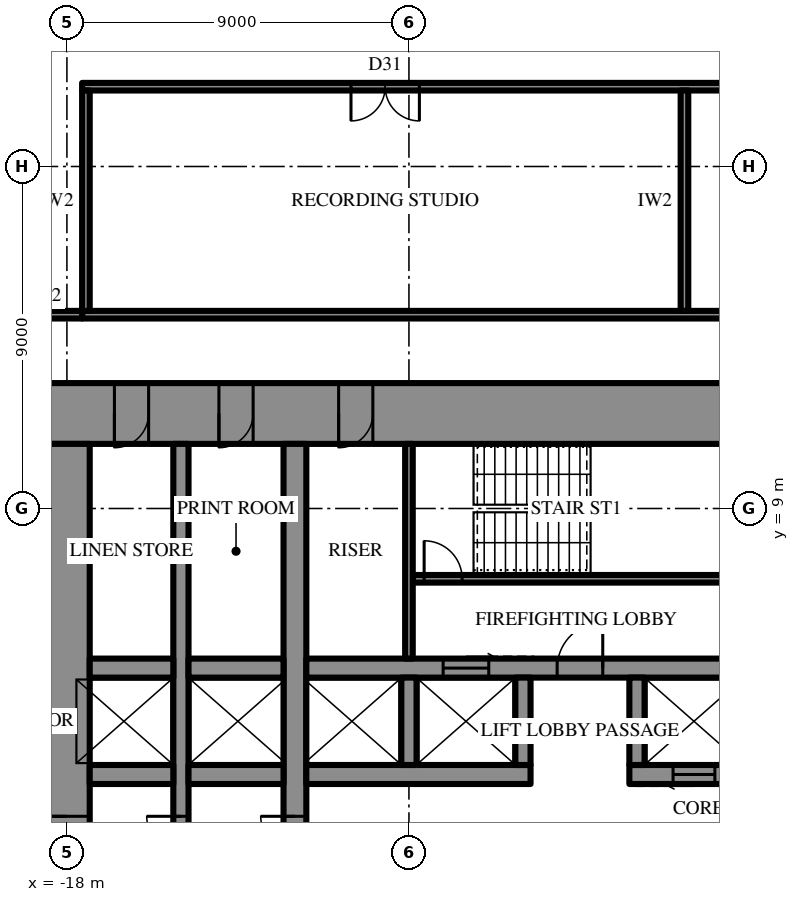
"""IFC4 building model, lengths in metres.
Left out: names, types, materials, properties, quantities, classifications, styles, units other than length and angle.
Written with IfcOpenShell. Run it as: python <this file> out.ifc"""

import sys

from ifc_helpers import new_model, si_unit, direction, frame, frame_2d, origin, place, context, subcontext, project, spatial, rectangle, extrude, element, fill, save


model = new_model("IFC4")
c1 = context("Model", 3, precision=1e-05, world=origin(), true_north=direction((0.0, 1.0)))
c2 = subcontext(c1, "Body", "Model", "MODEL_VIEW")
j1 = project(units=[si_unit("LENGTHUNIT", "METRE"), si_unit("PLANEANGLEUNIT", "RADIAN")], contexts=[c1])
p1 = place(None, origin())
s1 = spatial("IfcSite", under=j1, at=p1, CompositionType="ELEMENT")
p2 = place(p1, origin())
s2 = spatial("IfcBuilding", under=s1, at=p2, CompositionType="ELEMENT")
p3 = place(p2, frame((0.0, 0.0, 103.3)))
s3 = spatial("IfcBuildingStorey", under=s2, at=p3, CompositionType="ELEMENT", Elevation=103.3)
p4 = place(p3, frame((-18.6, 11.5, 0.0), z_axis=(0.0, 0.0, 1.0), x_axis=(1.0, 0.0, 0.0)))
e1 = element("IfcWall", 1, at=p4, inside=s3, PredefinedType="SHEAR", context=c2, shape_type="SweptSolid", body=[
    extrude(rectangle(XDim=37.2, YDim=1.6, at=frame_2d((18.6, 0.0))), origin(), (0.0, 0.0, 1.0), 4.2),
])
p5 = place(p4, frame((19.45, 0.0, 0.0)))
e2 = element("IfcOpeningElement", 2, at=p5, cuts=e1, PredefinedType="OPENING", context=c2, shape_type="SweptSolid", body=[
    extrude(rectangle(XDim=0.9, YDim=2.2, at=frame_2d((0.45, 1.1))), frame((0.0, 0.81, 0.0), z_axis=(0.0, -1.0, 0.0), x_axis=(1.0, 0.0, 0.0)), (0.0, 0.0, 1.0), 1.62),
])
p6 = place(p4, frame((22.45, 0.0, 0.0)))
e3 = element("IfcOpeningElement", 3, at=p6, cuts=e1, PredefinedType="OPENING", context=c2, shape_type="SweptSolid", body=[
    extrude(rectangle(XDim=0.9, YDim=2.2, at=frame_2d((0.45, 1.1))), frame((0.0, 0.81, 0.0), z_axis=(0.0, -1.0, 0.0), x_axis=(1.0, 0.0, 0.0)), (0.0, 0.0, 1.0), 1.62),
])
p7 = place(p4, frame((25.5, 0.0, 0.0)))
e4 = element("IfcOpeningElement", 4, at=p7, cuts=e1, PredefinedType="OPENING", context=c2, shape_type="SweptSolid", body=[
    extrude(rectangle(XDim=1.0, YDim=2.2, at=frame_2d((0.5, 1.1))), frame((0.0, 0.81, 0.0), z_axis=(0.0, -1.0, 0.0), x_axis=(1.0, 0.0, 0.0)), (0.0, 0.0, 1.0), 1.62),
])
p8 = place(p4, frame((1.85, 0.0, 0.0)))
e5 = element("IfcOpeningElement", 5, at=p8, cuts=e1, PredefinedType="OPENING", context=c2, shape_type="SweptSolid", body=[
    extrude(rectangle(XDim=0.9, YDim=2.2, at=frame_2d((0.45, 1.1))), frame((0.0, 0.81, 0.0), z_axis=(0.0, -1.0, 0.0), x_axis=(1.0, 0.0, 0.0)), (0.0, 0.0, 1.0), 1.62),
])
p9 = place(p4, frame((4.6, 0.0, 0.0)))
e6 = element("IfcOpeningElement", 6, at=p9, cuts=e1, PredefinedType="OPENING", context=c2, shape_type="SweptSolid", body=[
    extrude(rectangle(XDim=0.9, YDim=2.2, at=frame_2d((0.45, 1.1))), frame((0.0, 0.81, 0.0), z_axis=(0.0, -1.0, 0.0), x_axis=(1.0, 0.0, 0.0)), (0.0, 0.0, 1.0), 1.62),
])
p10 = place(p4, frame((7.75, 0.0, 0.0)))
e7 = element("IfcOpeningElement", 7, at=p10, cuts=e1, PredefinedType="OPENING", context=c2, shape_type="SweptSolid", body=[
    extrude(rectangle(XDim=0.9, YDim=2.2, at=frame_2d((0.45, 1.1))), frame((0.0, 0.81, 0.0), z_axis=(0.0, -1.0, 0.0), x_axis=(1.0, 0.0, 0.0)), (0.0, 0.0, 1.0), 1.62),
])
p11 = place(p4, frame((28.55, 0.0, 0.0)))
e8 = element("IfcOpeningElement", 8, at=p11, cuts=e1, PredefinedType="OPENING", context=c2, shape_type="SweptSolid", body=[
    extrude(rectangle(XDim=0.9, YDim=2.2, at=frame_2d((0.45, 1.1))), frame((0.0, 0.81, 0.0), z_axis=(0.0, -1.0, 0.0), x_axis=(1.0, 0.0, 0.0)), (0.0, 0.0, 1.0), 1.62),
])
p12 = place(p4, frame((31.7, 0.0, 0.0)))
e9 = element("IfcOpeningElement", 9, at=p12, cuts=e1, PredefinedType="OPENING", context=c2, shape_type="SweptSolid", body=[
    extrude(rectangle(XDim=0.9, YDim=2.2, at=frame_2d((0.45, 1.1))), frame((0.0, 0.81, 0.0), z_axis=(0.0, -1.0, 0.0), x_axis=(1.0, 0.0, 0.0)), (0.0, 0.0, 1.0), 1.62),
])
p13 = place(p4, frame((34.45, 0.0, 0.0)))
e10 = element("IfcOpeningElement", 10, at=p13, cuts=e1, PredefinedType="OPENING", context=c2, shape_type="SweptSolid", body=[
    extrude(rectangle(XDim=0.9, YDim=2.2, at=frame_2d((0.45, 1.1))), frame((0.0, 0.81, 0.0), z_axis=(0.0, -1.0, 0.0), x_axis=(1.0, 0.0, 0.0)), (0.0, 0.0, 1.0), 1.62),
])
p14 = place(p3, frame((-18.0, 10.7, 0.0), z_axis=(0.0, 0.0, 1.0), x_axis=(0.0, -1.0, 0.0)))
e11 = element("IfcWall", 11, at=p14, inside=s3, PredefinedType="SHEAR", context=c2, shape_type="SweptSolid", body=[
    extrude(rectangle(XDim=21.4, YDim=1.2, at=frame_2d((10.7, 0.0))), origin(), (0.0, 0.0, 1.0), 4.2),
])
p15 = place(p14, frame((9.8, 0.0, 0.0)))
e12 = element("IfcOpeningElement", 12, at=p15, cuts=e11, PredefinedType="OPENING", context=c2, shape_type="SweptSolid", body=[
    extrude(rectangle(XDim=1.8, YDim=2.4, at=frame_2d((0.9, 1.2))), frame((0.0, 0.61, 0.0), z_axis=(0.0, -1.0, 0.0), x_axis=(1.0, 0.0, 0.0)), (0.0, 0.0, 1.0), 1.22),
])
p16 = place(p3, frame((-12.0, -10.7, 0.0), z_axis=(0.0, 0.0, 1.0), x_axis=(0.0, 1.0, 0.0)))
e13 = element("IfcWall", 13, at=p16, inside=s3, PredefinedType="SHEAR", context=c2, shape_type="SweptSolid", body=[
    extrude(rectangle(XDim=21.4, YDim=0.6, at=frame_2d((10.7, 0.0))), origin(), (0.0, 0.0, 1.0), 4.2),
])
p17 = place(p16, frame((9.8, 0.0, 0.0)))
e14 = element("IfcOpeningElement", 14, at=p17, cuts=e13, PredefinedType="OPENING", context=c2, shape_type="SweptSolid", body=[
    extrude(rectangle(XDim=1.8, YDim=2.4, at=frame_2d((0.9, 1.2))), frame((0.0, 0.31, 0.0), z_axis=(0.0, -1.0, 0.0), x_axis=(1.0, 0.0, 0.0)), (0.0, 0.0, 1.0), 0.62),
])
p18 = place(p3, frame((-15.0, -10.7, 0.0), z_axis=(0.0, 0.0, 1.0), x_axis=(0.0, 1.0, 0.0)))
e15 = element("IfcWall", 15, at=p18, inside=s3, PredefinedType="SHEAR", context=c2, shape_type="SweptSolid", body=[
    extrude(rectangle(XDim=21.4, YDim=0.4, at=frame_2d((10.7, 0.0))), origin(), (0.0, 0.0, 1.0), 4.2),
])
p19 = place(p18, frame((9.8, 0.0, 0.0)))
e16 = element("IfcOpeningElement", 16, at=p19, cuts=e15, PredefinedType="OPENING", context=c2, shape_type="SweptSolid", body=[
    extrude(rectangle(XDim=1.8, YDim=2.4, at=frame_2d((0.9, 1.2))), frame((0.0, 0.21, 0.0), z_axis=(0.0, -1.0, 0.0), x_axis=(1.0, 0.0, 0.0)), (0.0, 0.0, 1.0), 0.42),
])
p20 = place(p3, frame((-17.4, 2.0, 0.0), z_axis=(0.0, 0.0, 1.0), x_axis=(1.0, 0.0, 0.0)))
e17 = element("IfcWall", 17, at=p20, inside=s3, PredefinedType="SHEAR", context=c2, shape_type="SweptSolid", body=[
    extrude(rectangle(XDim=2.2, YDim=0.5, at=frame_2d((1.1, 0.0))), origin(), (0.0, 0.0, 1.0), 4.2),
])
p21 = place(p3, frame((-14.8, 2.0, 0.0), z_axis=(0.0, 0.0, 1.0), x_axis=(1.0, 0.0, 0.0)))
e18 = element("IfcWall", 18, at=p21, inside=s3, PredefinedType="SHEAR", context=c2, shape_type="SweptSolid", body=[
    extrude(rectangle(XDim=2.5, YDim=0.5, at=frame_2d((1.25, 0.0))), origin(), (0.0, 0.0, 1.0), 4.2),
])
p22 = place(p3, frame((-11.7, 2.0, 0.0), z_axis=(0.0, 0.0, 1.0), x_axis=(1.0, 0.0, 0.0)))
e19 = element("IfcWall", 19, at=p22, inside=s3, PredefinedType="SHEAR", context=c2, shape_type="SweptSolid", body=[
    extrude(rectangle(XDim=5.9, YDim=0.5, at=frame_2d((2.95, 0.0))), origin(), (0.0, 0.0, 1.0), 4.2),
])
p23 = place(p3, frame((-3.2, 2.0, 0.0), z_axis=(0.0, 0.0, 1.0), x_axis=(1.0, 0.0, 0.0)))
e20 = element("IfcWall", 20, at=p23, inside=s3, PredefinedType="SHEAR", context=c2, shape_type="SweptSolid", body=[
    extrude(rectangle(XDim=14.9, YDim=0.5, at=frame_2d((7.45, 0.0))), origin(), (0.0, 0.0, 1.0), 4.2),
])
p24 = place(p23, frame((1.15, 0.0, 0.0)))
e21 = element("IfcOpeningElement", 21, at=p24, cuts=e20, PredefinedType="OPENING", context=c2, shape_type="SweptSolid", body=[
    extrude(rectangle(XDim=1.1, YDim=2.2, at=frame_2d((0.55, 1.1))), frame((0.0, 0.26, 0.0), z_axis=(0.0, -1.0, 0.0), x_axis=(1.0, 0.0, 0.0)), (0.0, 0.0, 1.0), 0.52),
])
p25 = place(p23, frame((4.15, 0.0, 0.0)))
e22 = element("IfcOpeningElement", 22, at=p25, cuts=e20, PredefinedType="OPENING", context=c2, shape_type="SweptSolid", body=[
    extrude(rectangle(XDim=1.1, YDim=2.2, at=frame_2d((0.55, 1.1))), frame((0.0, 0.26, 0.0), z_axis=(0.0, -1.0, 0.0), x_axis=(1.0, 0.0, 0.0)), (0.0, 0.0, 1.0), 0.52),
])
p26 = place(p23, frame((7.15, 0.0, 0.0)))
e23 = element("IfcOpeningElement", 23, at=p26, cuts=e20, PredefinedType="OPENING", context=c2, shape_type="SweptSolid", body=[
    extrude(rectangle(XDim=1.1, YDim=2.2, at=frame_2d((0.55, 1.1))), frame((0.0, 0.26, 0.0), z_axis=(0.0, -1.0, 0.0), x_axis=(1.0, 0.0, 0.0)), (0.0, 0.0, 1.0), 0.52),
])
p27 = place(p23, frame((10.15, 0.0, 0.0)))
e24 = element("IfcOpeningElement", 24, at=p27, cuts=e20, PredefinedType="OPENING", context=c2, shape_type="SweptSolid", body=[
    extrude(rectangle(XDim=1.1, YDim=2.2, at=frame_2d((0.55, 1.1))), frame((0.0, 0.26, 0.0), z_axis=(0.0, -1.0, 0.0), x_axis=(1.0, 0.0, 0.0)), (0.0, 0.0, 1.0), 0.52),
])
p28 = place(p3, frame((-17.4, 4.8, 0.0), z_axis=(0.0, 0.0, 1.0), x_axis=(1.0, 0.0, 0.0)))
e25 = element("IfcWall", 25, at=p28, inside=s3, PredefinedType="SHEAR", context=c2, shape_type="SweptSolid", body=[
    extrude(rectangle(XDim=2.2, YDim=0.5, at=frame_2d((1.1, 0.0))), origin(), (0.0, 0.0, 1.0), 4.2),
])
p29 = place(p3, frame((-14.8, 4.8, 0.0), z_axis=(0.0, 0.0, 1.0), x_axis=(1.0, 0.0, 0.0)))
e26 = element("IfcWall", 26, at=p29, inside=s3, PredefinedType="SHEAR", context=c2, shape_type="SweptSolid", body=[
    extrude(rectangle(XDim=2.5, YDim=0.5, at=frame_2d((1.25, 0.0))), origin(), (0.0, 0.0, 1.0), 4.2),
])
p30 = place(p3, frame((-11.7, 4.8, 0.0), z_axis=(0.0, 0.0, 1.0), x_axis=(1.0, 0.0, 0.0)))
e27 = element("IfcWall", 27, at=p30, inside=s3, PredefinedType="SHEAR", context=c2, shape_type="SweptSolid", body=[
    extrude(rectangle(XDim=23.4, YDim=0.5, at=frame_2d((11.7, 0.0))), origin(), (0.0, 0.0, 1.0), 4.2),
])
p31 = place(p30, frame((6.6, 0.0, 0.0)))
e28 = element("IfcOpeningElement", 28, at=p31, cuts=e27, PredefinedType="OPENING", context=c2, shape_type="SweptSolid", body=[
    extrude(rectangle(XDim=1.2, YDim=2.2, at=frame_2d((0.6, 1.1))), frame((0.0, 0.26, 0.0), z_axis=(0.0, -1.0, 0.0), x_axis=(1.0, 0.0, 0.0)), (0.0, 0.0, 1.0), 0.52),
])
p32 = place(p30, frame((3.6, 0.0, 0.0)))
e29 = element("IfcOpeningElement", 29, at=p32, cuts=e27, PredefinedType="OPENING", context=c2, shape_type="SweptSolid", body=[
    extrude(rectangle(XDim=1.2, YDim=2.2, at=frame_2d((0.6, 1.1))), frame((0.0, 0.26, 0.0), z_axis=(0.0, -1.0, 0.0), x_axis=(1.0, 0.0, 0.0)), (0.0, 0.0, 1.0), 0.52),
])
for number, where, z_axis, x_axis in (
    (30, (-9.0, 2.25, 0.0), (0.0, 0.0, 1.0), (0.0, 1.0, 0.0)),
    (31, (-6.0, 2.25, 0.0), (0.0, 0.0, 1.0), (0.0, 1.0, 0.0)),
    (32, (-3.0, 2.25, 0.0), (0.0, 0.0, 1.0), (0.0, 1.0, 0.0)),
):
    element("IfcWall", number, at=place(p3, frame(where, z_axis=z_axis, x_axis=x_axis)), inside=s3, PredefinedType="SHEAR", context=c2, shape_type="SweptSolid", body=[
        extrude(rectangle(XDim=2.3, YDim=0.4, at=frame_2d((1.15, 0.0))), origin(), (0.0, 0.0, 1.0), 4.2),
    ])
p33 = place(p3, frame((-8.9, 7.15, 0.0), z_axis=(0.0, 0.0, 1.0), x_axis=(1.0, 0.0, 0.0)))
e33 = element("IfcWall", 33, at=p33, inside=s3, PredefinedType="SHEAR", context=c2, shape_type="SweptSolid", body=[
    extrude(rectangle(XDim=8.6, YDim=0.2, at=frame_2d((4.3, 0.0))), origin(), (0.0, 0.0, 1.0), 4.2),
])
p34 = place(p33, frame((0.3, 0.0, 0.0)))
e34 = element("IfcOpeningElement", 34, at=p34, cuts=e33, PredefinedType="OPENING", context=c2, shape_type="SweptSolid", body=[
    extrude(rectangle(XDim=1.0, YDim=2.2, at=frame_2d((0.5, 1.1))), frame((0.0, 0.11, 0.0), z_axis=(0.0, -1.0, 0.0), x_axis=(1.0, 0.0, 0.0)), (0.0, 0.0, 1.0), 0.22),
])
p35 = place(p3, frame((-9.0, 5.05, 0.0), z_axis=(0.0, 0.0, 1.0), x_axis=(0.0, 1.0, 0.0)))
e35 = element("IfcWall", 35, at=p35, inside=s3, PredefinedType="PARTITIONING", context=c2, shape_type="SweptSolid", body=[
    extrude(rectangle(XDim=5.65, YDim=0.2, at=frame_2d((2.825, 0.0))), origin(), (0.0, 0.0, 1.0), 3.9),
])
p36 = place(p3, frame((-17.6, 14.1, 0.0), z_axis=(0.0, 0.0, 1.0), x_axis=(1.0, 0.0, 0.0)))
e36 = element("IfcWall", 36, at=p36, inside=s3, PredefinedType="PARTITIONING", context=c2, shape_type="SweptSolid", body=[
    extrude(rectangle(XDim=35.2, YDim=0.2, at=frame_2d((17.6, 0.0))), origin(), (0.0, 0.0, 1.0), 3.9),
])
p37 = place(p3, frame((-17.6, 20.1, 0.0), z_axis=(0.0, 0.0, 1.0), x_axis=(1.0, 0.0, 0.0)))
e37 = element("IfcWall", 37, at=p37, inside=s3, PredefinedType="PARTITIONING", context=c2, shape_type="SweptSolid", body=[
    extrude(rectangle(XDim=35.2, YDim=0.2, at=frame_2d((17.6, 0.0))), origin(), (0.0, 0.0, 1.0), 3.9),
])
p38 = place(p37, frame((7.075, 0.0, 0.0)))
e38 = element("IfcOpeningElement", 38, at=p38, cuts=e37, PredefinedType="OPENING", context=c2, shape_type="SweptSolid", body=[
    extrude(rectangle(XDim=1.8, YDim=2.4, at=frame_2d((0.9, 1.2))), frame((0.0, 0.11, 0.0), z_axis=(0.0, -1.0, 0.0), x_axis=(1.0, 0.0, 0.0)), (0.0, 0.0, 1.0), 0.22),
])
p39 = place(p37, frame((19.762, 0.0, 0.0)))
e39 = element("IfcOpeningElement", 39, at=p39, cuts=e37, PredefinedType="OPENING", context=c2, shape_type="SweptSolid", body=[
    extrude(rectangle(XDim=1.8, YDim=2.4, at=frame_2d((0.9, 1.2))), frame((0.0, 0.11, 0.0), z_axis=(0.0, -1.0, 0.0), x_axis=(1.0, 0.0, 0.0)), (0.0, 0.0, 1.0), 0.22),
])
p40 = place(p37, frame((29.387, 0.0, 0.0)))
e40 = element("IfcOpeningElement", 40, at=p40, cuts=e37, PredefinedType="OPENING", context=c2, shape_type="SweptSolid", body=[
    extrude(rectangle(XDim=1.8, YDim=2.4, at=frame_2d((0.9, 1.2))), frame((0.0, 0.11, 0.0), z_axis=(0.0, -1.0, 0.0), x_axis=(1.0, 0.0, 0.0)), (0.0, 0.0, 1.0), 0.22),
])
for number, where, z_axis, x_axis in (
    (41, (-17.5, 14.2, 0.0), (0.0, 0.0, 1.0), (0.0, 1.0, 0.0)),
    (42, (-1.75, 14.2, 0.0), (0.0, 0.0, 1.0), (0.0, 1.0, 0.0)),
):
    element("IfcWall", number, at=place(p3, frame(where, z_axis=z_axis, x_axis=x_axis)), inside=s3, PredefinedType="PARTITIONING", context=c2, shape_type="SweptSolid", body=[
        extrude(rectangle(XDim=5.8, YDim=0.2, at=frame_2d((2.9, 0.0))), origin(), (0.0, 0.0, 1.0), 3.9),
    ])
p41 = place(p3, frame((-19.6, 14.1, 0.0), z_axis=(0.0, 0.0, 1.0), x_axis=(1.0, 0.0, 0.0)))
e43 = element("IfcWall", 43, at=p41, inside=s3, PredefinedType="PARTITIONING", context=c2, shape_type="SweptSolid", body=[
    extrude(rectangle(XDim=2.0, YDim=0.2, at=frame_2d((1.0, 0.0))), origin(), (0.0, 0.0, 1.0), 3.9),
])
p42 = place(p15, frame((1.8, 0.0, 0.0), z_axis=(0.0, 0.0, 1.0), x_axis=(-1.0, 0.0, 0.0)))
e44 = element("IfcDoor", 44, at=p42, inside=s3, OperationType="DOUBLE_DOOR_SINGLE_SWING", PredefinedType="DOOR", context=c2, shape_type="SweptSolid", body=[
    extrude(rectangle(XDim=1.8, YDim=2.4, at=frame_2d((0.9, 1.2))), frame((0.0, 0.025, 0.0), z_axis=(0.0, -1.0, 0.0), x_axis=(1.0, 0.0, 0.0)), (0.0, 0.0, 1.0), 0.05),
])
fill(e12, e44)
p43 = place(p31, origin())
e45 = element("IfcDoor", 45, at=p43, inside=s3, OperationType="SINGLE_SWING_LEFT", PredefinedType="DOOR", context=c2, shape_type="SweptSolid", body=[
    extrude(rectangle(XDim=1.2, YDim=2.2, at=frame_2d((0.6, 1.1))), frame((0.0, 0.025, 0.0), z_axis=(0.0, -1.0, 0.0), x_axis=(1.0, 0.0, 0.0)), (0.0, 0.0, 1.0), 0.05),
])
fill(e28, e45)
p44 = place(p34, origin())
e46 = element("IfcDoor", 46, at=p44, inside=s3, OperationType="SINGLE_SWING_RIGHT", PredefinedType="DOOR", context=c2, shape_type="SweptSolid", body=[
    extrude(rectangle(XDim=1.0, YDim=2.2, at=frame_2d((0.5, 1.1))), frame((0.0, 0.025, 0.0), z_axis=(0.0, -1.0, 0.0), x_axis=(1.0, 0.0, 0.0)), (0.0, 0.0, 1.0), 0.05),
])
fill(e34, e46)
p45 = place(p8, frame((0.9, 0.0, 0.0), z_axis=(0.0, 0.0, 1.0), x_axis=(-1.0, 0.0, 0.0)))
e47 = element("IfcDoor", 47, at=p45, inside=s3, OperationType="SINGLE_SWING_LEFT", PredefinedType="DOOR", context=c2, shape_type="SweptSolid", body=[
    extrude(rectangle(XDim=0.9, YDim=2.2, at=frame_2d((0.45, 1.1))), frame((0.0, 0.025, 0.0), z_axis=(0.0, -1.0, 0.0), x_axis=(1.0, 0.0, 0.0)), (0.0, 0.0, 1.0), 0.05),
])
fill(e5, e47)
p46 = place(p9, frame((0.9, 0.0, 0.0), z_axis=(0.0, 0.0, 1.0), x_axis=(-1.0, 0.0, 0.0)))
e48 = element("IfcDoor", 48, at=p46, inside=s3, OperationType="SINGLE_SWING_LEFT", PredefinedType="DOOR", context=c2, shape_type="SweptSolid", body=[
    extrude(rectangle(XDim=0.9, YDim=2.2, at=frame_2d((0.45, 1.1))), frame((0.0, 0.025, 0.0), z_axis=(0.0, -1.0, 0.0), x_axis=(1.0, 0.0, 0.0)), (0.0, 0.0, 1.0), 0.05),
])
fill(e6, e48)
p47 = place(p10, frame((0.9, 0.0, 0.0), z_axis=(0.0, 0.0, 1.0), x_axis=(-1.0, 0.0, 0.0)))
e49 = element("IfcDoor", 49, at=p47, inside=s3, OperationType="SINGLE_SWING_LEFT", PredefinedType="DOOR", context=c2, shape_type="SweptSolid", body=[
    extrude(rectangle(XDim=0.9, YDim=2.2, at=frame_2d((0.45, 1.1))), frame((0.0, 0.025, 0.0), z_axis=(0.0, -1.0, 0.0), x_axis=(1.0, 0.0, 0.0)), (0.0, 0.0, 1.0), 0.05),
])
fill(e7, e49)
p48 = place(p17, origin())
e50 = element("IfcDoor", 50, at=p48, inside=s3, OperationType="DOUBLE_DOOR_SINGLE_SWING", PredefinedType="DOOR", context=c2, shape_type="SweptSolid", body=[
    extrude(rectangle(XDim=1.8, YDim=2.4, at=frame_2d((0.9, 1.2))), frame((0.0, 0.025, 0.0), z_axis=(0.0, -1.0, 0.0), x_axis=(1.0, 0.0, 0.0)), (0.0, 0.0, 1.0), 0.05),
])
fill(e14, e50)
p49 = place(p19, origin())
e51 = element("IfcDoor", 51, at=p49, inside=s3, OperationType="DOUBLE_DOOR_SINGLE_SWING", PredefinedType="DOOR", context=c2, shape_type="SweptSolid", body=[
    extrude(rectangle(XDim=1.8, YDim=2.4, at=frame_2d((0.9, 1.2))), frame((0.0, 0.025, 0.0), z_axis=(0.0, -1.0, 0.0), x_axis=(1.0, 0.0, 0.0)), (0.0, 0.0, 1.0), 0.05),
])
fill(e16, e51)
p50 = place(p32, origin())
e52 = element("IfcDoor", 52, at=p50, inside=s3, OperationType="SLIDING_TO_LEFT", PredefinedType="DOOR", context=c2, shape_type="SweptSolid", body=[
    extrude(rectangle(XDim=1.2, YDim=2.2, at=frame_2d((0.6, 1.1))), frame((0.0, 0.025, 0.0), z_axis=(0.0, -1.0, 0.0), x_axis=(1.0, 0.0, 0.0)), (0.0, 0.0, 1.0), 0.05),
])
fill(e29, e52)
p51 = place(p24, frame((1.1, 0.0, 0.0), z_axis=(0.0, 0.0, 1.0), x_axis=(-1.0, 0.0, 0.0)))
e53 = element("IfcDoor", 53, at=p51, inside=s3, OperationType="SLIDING_TO_LEFT", PredefinedType="DOOR", context=c2, shape_type="SweptSolid", body=[
    extrude(rectangle(XDim=1.1, YDim=2.2, at=frame_2d((0.55, 1.1))), frame((0.0, 0.025, 0.0), z_axis=(0.0, -1.0, 0.0), x_axis=(1.0, 0.0, 0.0)), (0.0, 0.0, 1.0), 0.05),
])
fill(e21, e53)
p52 = place(p38, frame((1.8, 0.0, 0.0), z_axis=(0.0, 0.0, 1.0), x_axis=(-1.0, 0.0, 0.0)))
e54 = element("IfcDoor", 54, at=p52, inside=s3, OperationType="DOUBLE_DOOR_SINGLE_SWING", PredefinedType="DOOR", context=c2, shape_type="SweptSolid", body=[
    extrude(rectangle(XDim=1.8, YDim=2.4, at=frame_2d((0.9, 1.2))), frame((0.0, 0.025, 0.0), z_axis=(0.0, -1.0, 0.0), x_axis=(1.0, 0.0, 0.0)), (0.0, 0.0, 1.0), 0.05),
])
fill(e38, e54)
save(model, sys.argv[1])
